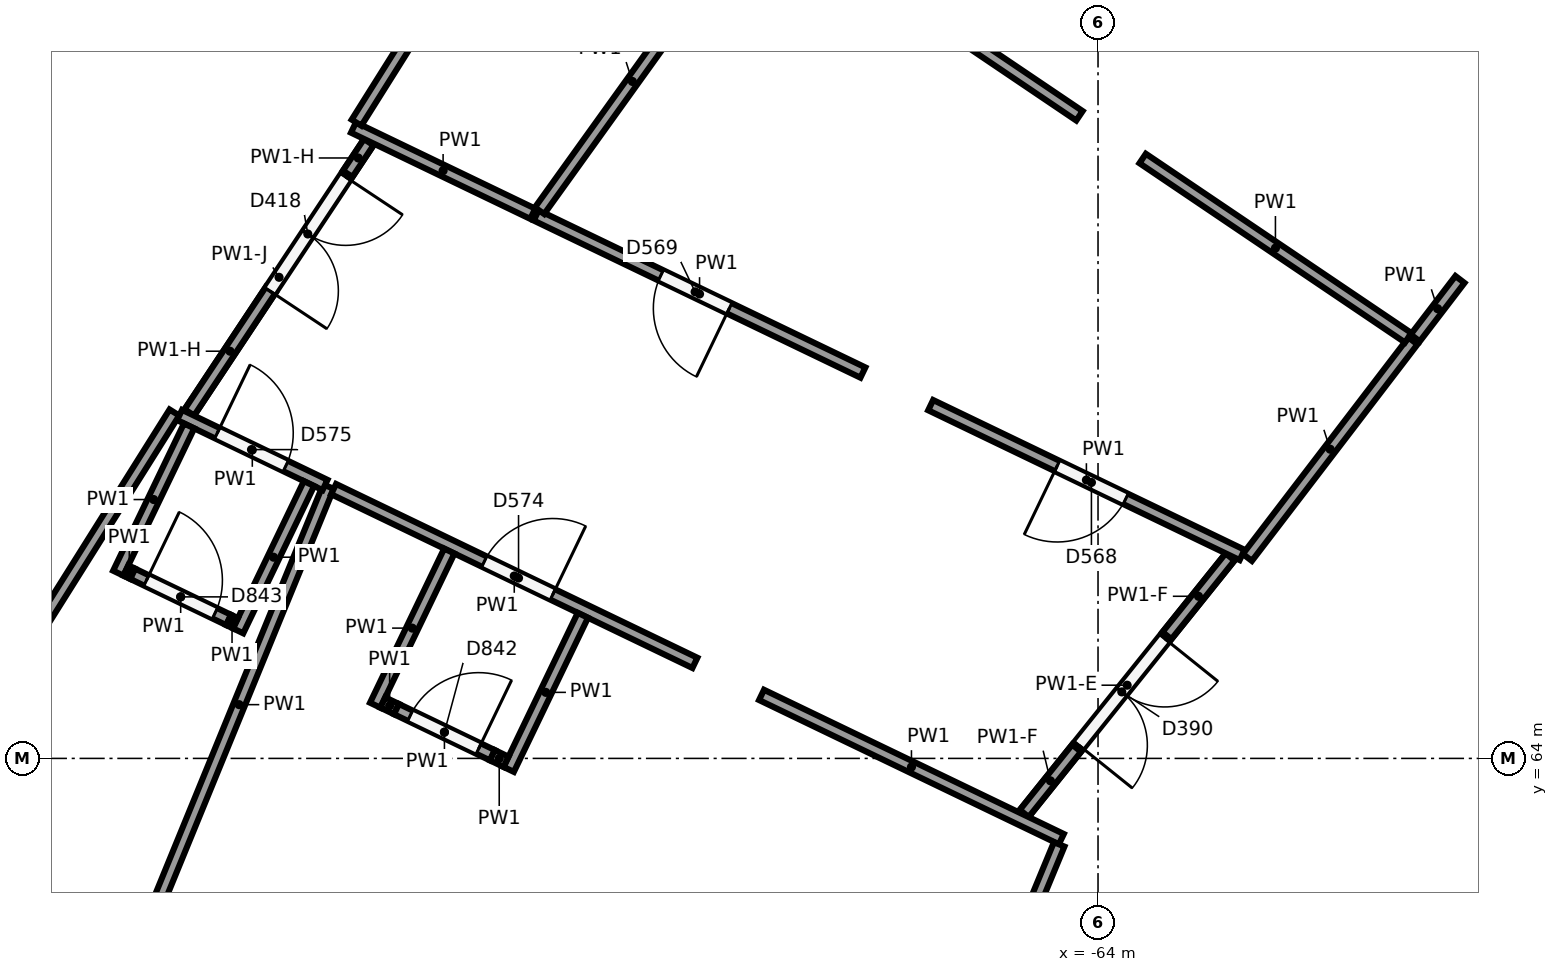
"""IFC4 building model, lengths in metres.
Left out: names, types, materials, properties, quantities, classifications, styles, units other than length and angle.
Written with IfcOpenShell. Run it as: python <this file> out.ifc"""

import sys

from ifc_helpers import new_model, si_unit, direction, frame, frame_2d, origin, origin_2d, place, context, subcontext, project, spatial, rectangle, circle, extrude, element, fill, save


model = new_model("IFC4")
c1 = context("Model", 3, precision=1e-05, world=origin(), true_north=direction((0.0, 1.0)))
c2 = subcontext(c1, "Body", "Model", "MODEL_VIEW")
j1 = project(units=[si_unit("LENGTHUNIT", "METRE"), si_unit("PLANEANGLEUNIT", "RADIAN")], contexts=[c1])
p1 = place(None, origin())
s1 = spatial("IfcSite", under=j1, at=p1, CompositionType="ELEMENT")
p2 = place(p1, origin())
s2 = spatial("IfcBuilding", under=s1, at=p2, CompositionType="ELEMENT")
p3 = place(p2, origin())
s3 = spatial("IfcBuildingStorey", under=s2, at=p3, CompositionType="ELEMENT", Elevation=0.0)
for number, where, z_axis, x_axis in (
    (1, (-63.068, 73.47, 0.0), (0.0, 0.0, 1.0), (1.0, 0.0, 0.0)),
    (2, (-59.049, 62.766, 0.0), (0.0, 0.0, 1.0), (1.0, 0.0, 0.0)),
):
    element("IfcColumn", number, at=place(p3, frame(where, z_axis=z_axis, x_axis=x_axis)), inside=s3, PredefinedType="COLUMN", context=c2, shape_type="SweptSolid", body=[
        extrude(circle(Radius=0.45, at=origin_2d()), origin(), (0.0, 0.0, 1.0), 6.5),
    ])
p4 = place(p3, frame((-60.222, 63.331, 0.0), z_axis=(0.0, 0.0, 1.0), x_axis=(1.0, 0.0, 0.0)))
e3 = element("IfcColumn", 3, at=p4, inside=s3, PredefinedType="COLUMN", context=c2, shape_type="SweptSolid", body=[
    extrude(circle(Radius=0.4, at=origin_2d()), origin(), (0.0, 0.0, 1.0), 6.5),
])
p5 = place(p3, frame((-67.972, 67.058, 0.0), z_axis=(0.0, 0.0, 1.0), x_axis=(1.0, 0.0, 0.0)))
e4 = element("IfcColumn", 4, at=p5, inside=s3, PredefinedType="COLUMN", context=c2, shape_type="SweptSolid", body=[
    extrude(circle(Radius=0.45, at=origin_2d()), origin(), (0.0, 0.0, 1.0), 6.5),
])
p6 = place(p3, frame((-78.198, 72.272, 0.0), z_axis=(0.0, 0.0, 1.0), x_axis=(1.0, 0.0, 0.0)))
e5 = element("IfcColumn", 5, at=p6, inside=s3, PredefinedType="COLUMN", context=c2, shape_type="SweptSolid", body=[
    extrude(circle(Radius=0.6, at=origin_2d()), origin(), (0.0, 0.0, 1.0), 6.5),
])
p7 = place(p3, frame((-59.857, 69.492, 0.0), z_axis=(0.0, 0.0, 1.0), x_axis=(-0.607500647977, -0.794319181883, 0.0)))
e6 = element("IfcWall", 6, at=p7, inside=s3, PredefinedType="PARTITIONING", context=c2, shape_type="SweptSolid", body=[
    extrude(rectangle(XDim=3.586, YDim=0.15, at=frame_2d((1.793, 0.0))), origin(), (0.0, 0.0, 1.0), 6.15),
])
p8 = place(p3, frame((-62.104, 66.677, 0.0), z_axis=(0.0, 0.0, 1.0), x_axis=(-0.901215323509, 0.433371596523, 0.0)))
e7 = element("IfcWall", 7, at=p8, inside=s3, PredefinedType="PARTITIONING", context=c2, shape_type="SweptSolid", body=[
    extrude(rectangle(XDim=4.547, YDim=0.15, at=frame_2d((2.273, 0.0))), origin(), (0.0, 0.0, 1.0), 6.15),
])
p9 = place(p8, frame((1.7, 0.0, 0.0)))
e8 = element("IfcOpeningElement", 8, at=p9, cuts=e7, PredefinedType="OPENING", context=c2, shape_type="SweptSolid", body=[
    extrude(rectangle(XDim=1.0, YDim=2.1, at=frame_2d((0.5, 1.05))), frame((0.0, 0.085, 0.0), z_axis=(0.0, -1.0, 0.0), x_axis=(1.0, 0.0, 0.0)), (0.0, 0.0, 1.0), 0.17),
])
p10 = place(p3, frame((-63.413, 71.893, 0.0), z_axis=(0.0, 0.0, 1.0), x_axis=(0.828828529776, -0.559502697249, 0.0)))
e9 = element("IfcWall", 9, at=p10, inside=s3, PredefinedType="PARTITIONING", context=c2, shape_type="SweptSolid", body=[
    extrude(rectangle(XDim=4.215, YDim=0.15, at=frame_2d((2.107, 0.0))), origin(), (0.0, 0.0, 1.0), 6.15),
])
p11 = place(p3, frame((-67.094, 69.076, 0.0), z_axis=(0.0, 0.0, 1.0), x_axis=(-0.901200145097, 0.433403159284, 0.0)))
e10 = element("IfcWall", 10, at=p11, inside=s3, PredefinedType="PARTITIONING", context=c2, shape_type="SweptSolid", body=[
    extrude(rectangle(XDim=4.77, YDim=0.15, at=frame_2d((2.385, 0.0))), origin(), (0.0, 0.0, 1.0), 6.15),
])
p12 = place(p11, frame((1.95, 0.0, 0.0)))
e11 = element("IfcOpeningElement", 11, at=p12, cuts=e10, PredefinedType="OPENING", context=c2, shape_type="SweptSolid", body=[
    extrude(rectangle(XDim=1.0, YDim=2.1, at=frame_2d((0.5, 1.05))), frame((0.0, 0.085, 0.0), z_axis=(0.0, -1.0, 0.0), x_axis=(1.0, 0.0, 0.0)), (0.0, 0.0, 1.0), 0.17),
])
p13 = place(p3, frame((-71.348, 71.206, 0.0), z_axis=(0.0, 0.0, 1.0), x_axis=(0.583304436704, 0.812253614409, 0.0)))
e12 = element("IfcWall", 12, at=p13, inside=s3, PredefinedType="PARTITIONING", context=c2, shape_type="SweptSolid", body=[
    extrude(rectangle(XDim=4.188, YDim=0.15, at=frame_2d((2.094, 0.0))), origin(), (0.0, 0.0, 1.0), 6.15),
])
p14 = place(p3, frame((-68.075, 75.04, 0.0), z_axis=(0.0, 0.0, 1.0), x_axis=(0.82883458938, -0.55949372065, 0.0)))
e13 = element("IfcWall", 13, at=p14, inside=s3, PredefinedType="PARTITIONING", context=c2, shape_type="SweptSolid", body=[
    extrude(rectangle(XDim=4.622, YDim=0.15, at=frame_2d((2.311, 0.0))), origin(), (0.0, 0.0, 1.0), 6.15),
])
p15 = place(p3, frame((-59.238, 70.301, 0.0), z_axis=(0.0, 0.0, 1.0), x_axis=(-0.607515602577, -0.794307744282, 0.0)))
e14 = element("IfcWall", 14, at=p15, inside=s3, PredefinedType="PARTITIONING", context=c2, shape_type="SweptSolid", body=[
    extrude(rectangle(XDim=0.969, YDim=0.15, at=frame_2d((0.484, 0.0))), origin(), (0.0, 0.0, 1.0), 6.15),
])
p16 = place(p3, frame((-71.437, 71.165, 0.0), z_axis=(0.0, 0.0, 1.0), x_axis=(-0.901204092293, 0.433394951556, 0.0)))
e15 = element("IfcWall", 15, at=p16, inside=s3, PredefinedType="PARTITIONING", context=c2, shape_type="SweptSolid", body=[
    extrude(rectangle(XDim=2.618, YDim=0.15, at=frame_2d((1.309, 0.0))), origin(), (0.0, 0.0, 1.0), 6.15),
])
p17 = place(p3, frame((-73.756, 72.364, 0.0), z_axis=(0.0, 0.0, 1.0), x_axis=(0.532054374811, 0.846710187871, 0.0)))
e16 = element("IfcWall", 16, at=p17, inside=s3, PredefinedType="PARTITIONING", context=c2, shape_type="SweptSolid", body=[
    extrude(rectangle(XDim=2.731, YDim=0.15, at=frame_2d((1.366, 0.0))), origin(), (0.0, 0.0, 1.0), 6.15),
])
p18 = place(p3, frame((-76.476, 61.839, 0.0), z_axis=(0.0, 0.0, 1.0), x_axis=(0.3791112098, 0.92535111747, 0.0)))
e17 = element("IfcWall", 17, at=p18, inside=s3, PredefinedType="PARTITIONING", context=c2, shape_type="SweptSolid", body=[
    extrude(rectangle(XDim=6.2, YDim=0.15, at=frame_2d((3.1, 0.0))), origin(), (0.0, 0.0, 1.0), 6.15),
])
p19 = place(p3, frame((-74.058, 67.543, 0.0), z_axis=(0.0, 0.0, 1.0), x_axis=(0.90118985402, -0.433424557462, 0.0)))
e18 = element("IfcWall", 18, at=p19, inside=s3, PredefinedType="PARTITIONING", context=c2, shape_type="SweptSolid", body=[
    extrude(rectangle(XDim=5.275, YDim=0.15, at=frame_2d((2.638, 0.0))), origin(), (0.0, 0.0, 1.0), 6.15),
])
p20 = place(p19, frame((2.2, 0.0, 0.0)))
e19 = element("IfcOpeningElement", 19, at=p20, cuts=e18, PredefinedType="OPENING", context=c2, shape_type="SweptSolid", body=[
    extrude(rectangle(XDim=1.0, YDim=2.1, at=frame_2d((0.5, 1.05))), frame((0.0, 0.085, 0.0), z_axis=(0.0, -1.0, 0.0), x_axis=(1.0, 0.0, 0.0)), (0.0, 0.0, 1.0), 0.17),
])
p21 = place(p3, frame((-68.427, 64.835, 0.0), z_axis=(0.0, 0.0, 1.0), x_axis=(0.901214723888, -0.433372843459, 0.0)))
e20 = element("IfcWall", 20, at=p21, inside=s3, PredefinedType="PARTITIONING", context=c2, shape_type="SweptSolid", body=[
    extrude(rectangle(XDim=4.377, YDim=0.15, at=frame_2d((2.188, 0.0))), origin(), (0.0, 0.0, 1.0), 6.15),
])
p22 = place(p3, frame((-64.511, 62.869, 0.0), z_axis=(0.0, 0.0, 1.0), x_axis=(-0.382677430763, -0.923882018433, 0.0)))
e21 = element("IfcWall", 21, at=p22, inside=s3, PredefinedType="PARTITIONING", context=c2, shape_type="SweptSolid", body=[
    extrude(rectangle(XDim=4.591, YDim=0.15, at=frame_2d((2.295, 0.0))), origin(), (0.0, 0.0, 1.0), 6.15),
])
p23 = place(p3, frame((-79.605, 63.055, 0.0), z_axis=(0.0, 0.0, 1.0), x_axis=(0.532032873767, 0.846723698281, 0.0)))
e22 = element("IfcWall", 22, at=p23, inside=s3, PredefinedType="PARTITIONING", context=c2, shape_type="SweptSolid", body=[
    extrude(rectangle(XDim=6.49, YDim=0.15, at=frame_2d((3.245, 0.0))), origin(), (0.0, 0.0, 1.0), 6.15),
])
p24 = place(p3, frame((-76.084, 68.518, 0.0), z_axis=(0.0, 0.0, 1.0), x_axis=(0.901196299468, -0.433411155631, 0.0)))
e23 = element("IfcWall", 23, at=p24, inside=s3, PredefinedType="PARTITIONING", context=c2, shape_type="SweptSolid", body=[
    extrude(rectangle(XDim=2.124, YDim=0.15, at=frame_2d((1.062, 0.0))), origin(), (0.0, 0.0, 1.0), 6.15),
])
p25 = place(p24, frame((0.55, 0.0, 0.0)))
e24 = element("IfcOpeningElement", 24, at=p25, cuts=e23, PredefinedType="OPENING", context=c2, shape_type="SweptSolid", body=[
    extrude(rectangle(XDim=1.0, YDim=2.1, at=frame_2d((0.5, 1.05))), frame((0.0, 0.085, 0.0), z_axis=(0.0, -1.0, 0.0), x_axis=(1.0, 0.0, 0.0)), (0.0, 0.0, 1.0), 0.17),
])
p26 = place(p3, frame((-72.535, 66.728, 0.0), z_axis=(0.0, 0.0, 1.0), x_axis=(-0.433401217297, -0.901201079031, 0.0)))
e25 = element("IfcWall", 25, at=p26, inside=s3, PredefinedType="PARTITIONING", context=c2, shape_type="SweptSolid", body=[
    extrude(rectangle(XDim=2.25, YDim=0.15, at=frame_2d((1.125, 0.0))), origin(), (0.0, 0.0, 1.0), 6.15),
])
p27 = place(p3, frame((-70.778, 65.883, 0.0), z_axis=(0.0, 0.0, 1.0), x_axis=(-0.433446957245, -0.901179080569, 0.0)))
e26 = element("IfcWall", 26, at=p27, inside=s3, PredefinedType="PARTITIONING", context=c2, shape_type="SweptSolid", body=[
    extrude(rectangle(XDim=2.25, YDim=0.15, at=frame_2d((1.125, 0.0))), origin(), (0.0, 0.0, 1.0), 6.15),
])
p28 = place(p3, frame((-73.41, 64.735, 0.0), z_axis=(0.0, 0.0, 1.0), x_axis=(0.901160703759, -0.433485162377, 0.0)))
e27 = element("IfcWall", 27, at=p28, inside=s3, PredefinedType="PARTITIONING", context=c2, shape_type="SweptSolid", body=[
    extrude(rectangle(XDim=0.2, YDim=0.15, at=frame_2d((0.1, 0.0))), origin(), (0.0, 0.0, 1.0), 6.15),
])
p29 = place(p3, frame((-73.23, 64.649, 0.0), z_axis=(0.0, 0.0, 1.0), x_axis=(0.901158119361, -0.433490534971, 0.0)))
e28 = element("IfcWall", 28, at=p29, inside=s3, PredefinedType="PARTITIONING", context=c2, shape_type="SweptSolid", body=[
    extrude(rectangle(XDim=1.4, YDim=0.15, at=frame_2d((0.7, 0.0))), origin(), (0.0, 0.0, 1.0), 6.15),
])
p30 = place(p29, frame((0.2, 0.0, 0.0)))
e29 = element("IfcOpeningElement", 29, at=p30, cuts=e28, PredefinedType="OPENING", context=c2, shape_type="SweptSolid", body=[
    extrude(rectangle(XDim=1.0, YDim=2.1, at=frame_2d((0.5, 1.05))), frame((0.0, 0.085, 0.0), z_axis=(0.0, -1.0, 0.0), x_axis=(1.0, 0.0, 0.0)), (0.0, 0.0, 1.0), 0.17),
])
p31 = place(p3, frame((-71.969, 64.042, 0.0), z_axis=(0.0, 0.0, 1.0), x_axis=(0.901160703759, -0.433485162377, 0.0)))
e30 = element("IfcWall", 30, at=p31, inside=s3, PredefinedType="PARTITIONING", context=c2, shape_type="SweptSolid", body=[
    extrude(rectangle(XDim=0.2, YDim=0.15, at=frame_2d((0.1, 0.0))), origin(), (0.0, 0.0, 1.0), 6.15),
])
for number, where, z_axis, x_axis in (
    (31, (-75.959, 68.375, 0.0), (0.0, 0.0, 1.0), (-0.433, -0.901, 0.0)),
    (32, (-74.382, 67.616, 0.0), (0.0, 0.0, 1.0), (-0.433, -0.901, 0.0)),
):
    element("IfcWall", number, at=place(p3, frame(where, z_axis=z_axis, x_axis=x_axis)), inside=s3, PredefinedType="PARTITIONING", context=c2, shape_type="SweptSolid", body=[
        extrude(rectangle(XDim=2.15, YDim=0.15, at=frame_2d((1.075, 0.0))), origin(), (0.0, 0.0, 1.0), 6.15),
    ])
p32 = place(p3, frame((-76.791, 66.472, 0.0), z_axis=(0.0, 0.0, 1.0), x_axis=(0.900683407008, -0.434476006633, 0.0)))
e33 = element("IfcWall", 33, at=p32, inside=s3, PredefinedType="PARTITIONING", context=c2, shape_type="SweptSolid", body=[
    extrude(rectangle(XDim=0.1, YDim=0.15, at=frame_2d((0.05, 0.0))), origin(), (0.0, 0.0, 1.0), 6.15),
])
p33 = place(p3, frame((-76.701, 66.428, 0.0), z_axis=(0.0, 0.0, 1.0), x_axis=(0.901226230947, -0.433348913294, 0.0)))
e34 = element("IfcWall", 34, at=p33, inside=s3, PredefinedType="PARTITIONING", context=c2, shape_type="SweptSolid", body=[
    extrude(rectangle(XDim=1.4, YDim=0.15, at=frame_2d((0.7, 0.0))), origin(), (0.0, 0.0, 1.0), 6.15),
])
p34 = place(p33, frame((0.2, 0.0, 0.0)))
e35 = element("IfcOpeningElement", 35, at=p34, cuts=e34, PredefinedType="OPENING", context=c2, shape_type="SweptSolid", body=[
    extrude(rectangle(XDim=1.0, YDim=2.1, at=frame_2d((0.5, 1.05))), frame((0.0, 0.085, 0.0), z_axis=(0.0, -1.0, 0.0), x_axis=(1.0, 0.0, 0.0)), (0.0, 0.0, 1.0), 0.17),
])
p35 = place(p3, frame((-75.439, 65.822, 0.0), z_axis=(0.0, 0.0, 1.0), x_axis=(0.900683407008, -0.434476006633, 0.0)))
e36 = element("IfcWall", 36, at=p35, inside=s3, PredefinedType="PARTITIONING", context=c2, shape_type="SweptSolid", body=[
    extrude(rectangle(XDim=0.1, YDim=0.15, at=frame_2d((0.05, 0.0))), origin(), (0.0, 0.0, 1.0), 6.15),
])
p36 = place(p3, frame((-73.595, 72.108, 0.0), z_axis=(0.0, 0.0, 1.0), x_axis=(-0.552890314707, -0.833254042837, 0.0)))
e37 = element("IfcWall", 37, at=p36, inside=s3, PredefinedType="PARTITIONING", context=c2, shape_type="SweptSolid", body=[
    extrude(rectangle(XDim=4.268, YDim=0.15, at=frame_2d((2.134, 0.0))), origin(), (0.0, 0.0, 1.0), 5.05),
])
p37 = place(p36, frame((0.55, 0.0, 0.0)))
e38 = element("IfcOpeningElement", 38, at=p37, cuts=e37, PredefinedType="OPENING", context=c2, shape_type="SweptSolid", body=[
    extrude(rectangle(XDim=1.8, YDim=2.1, at=frame_2d((0.9, 1.05))), frame((0.0, 0.085, 0.0), z_axis=(0.0, -1.0, 0.0), x_axis=(1.0, 0.0, 0.0)), (0.0, 0.0, 1.0), 0.17),
])
p38 = place(p3, frame((-73.595, 72.108, 5.05), z_axis=(0.0, 0.0, 1.0), x_axis=(-0.552670537612, -0.833399830127, 0.0)))
e39 = element("IfcWall", 39, at=p38, inside=s3, PredefinedType="PARTITIONING", context=c2, shape_type="SweptSolid", body=[
    extrude(rectangle(XDim=0.5, YDim=0.15, at=frame_2d((0.25, 0.0))), origin(), (0.0, 0.0, 1.0), 1.1),
])
p39 = place(p3, frame((-74.886, 70.163, 5.05), z_axis=(0.0, 0.0, 1.0), x_axis=(-0.552921485194, -0.833233359396, 0.0)))
e40 = element("IfcWall", 40, at=p39, inside=s3, PredefinedType="PARTITIONING", context=c2, shape_type="SweptSolid", body=[
    extrude(rectangle(XDim=1.934, YDim=0.15, at=frame_2d((0.967, 0.0))), origin(), (0.0, 0.0, 1.0), 1.1),
])
p40 = place(p3, frame((-62.263, 66.65, 0.0), z_axis=(0.0, 0.0, 1.0), x_axis=(-0.625864340601, -0.77993193752, 0.0)))
e41 = element("IfcWall", 41, at=p40, inside=s3, PredefinedType="PARTITIONING", context=c2, shape_type="SweptSolid", body=[
    extrude(rectangle(XDim=4.326, YDim=0.15, at=frame_2d((2.163, 0.0))), origin(), (0.0, 0.0, 1.0), 5.25),
])
p41 = place(p40, frame((1.376, 0.0, 0.0)))
e42 = element("IfcOpeningElement", 42, at=p41, cuts=e41, PredefinedType="OPENING", context=c2, shape_type="SweptSolid", body=[
    extrude(rectangle(XDim=1.8, YDim=2.1, at=frame_2d((0.9, 1.05))), frame((0.0, 0.085, 0.0), z_axis=(0.0, -1.0, 0.0), x_axis=(1.0, 0.0, 0.0)), (0.0, 0.0, 1.0), 0.17),
])
p42 = place(p3, frame((-64.282, 64.134, 5.25), z_axis=(0.0, 0.0, 1.0), x_axis=(-0.625885246077, -0.779915161247, 0.0)))
e43 = element("IfcWall", 43, at=p42, inside=s3, PredefinedType="PARTITIONING", context=c2, shape_type="SweptSolid", body=[
    extrude(rectangle(XDim=1.1, YDim=0.15, at=frame_2d((0.55, 0.0))), origin(), (0.0, 0.0, 1.0), 0.9),
])
p43 = place(p3, frame((-62.263, 66.65, 5.25), z_axis=(0.0, 0.0, 1.0), x_axis=(-0.62586166686, -0.779934083084, 0.0)))
e44 = element("IfcWall", 44, at=p43, inside=s3, PredefinedType="PARTITIONING", context=c2, shape_type="SweptSolid", body=[
    extrude(rectangle(XDim=1.326, YDim=0.15, at=frame_2d((0.663, 0.0))), origin(), (0.0, 0.0, 1.0), 0.9),
])
p44 = place(p9, origin())
e45 = element("IfcDoor", 45, at=p44, inside=s3, OperationType="SINGLE_SWING_RIGHT", PredefinedType="DOOR", context=c2, shape_type="SweptSolid", body=[
    extrude(rectangle(XDim=1.0, YDim=2.1, at=frame_2d((0.5, 1.05))), frame((0.0, 0.025, 0.0), z_axis=(0.0, -1.0, 0.0), x_axis=(1.0, 0.0, 0.0)), (0.0, 0.0, 1.0), 0.05),
])
fill(e8, e45)
p45 = place(p12, origin())
e46 = element("IfcDoor", 46, at=p45, inside=s3, OperationType="SINGLE_SWING_LEFT", PredefinedType="DOOR", context=c2, shape_type="SweptSolid", body=[
    extrude(rectangle(XDim=1.0, YDim=2.1, at=frame_2d((0.5, 1.05))), frame((0.0, 0.025, 0.0), z_axis=(0.0, -1.0, 0.0), x_axis=(1.0, 0.0, 0.0)), (0.0, 0.0, 1.0), 0.05),
])
fill(e11, e46)
p46 = place(p20, origin())
e47 = element("IfcDoor", 47, at=p46, inside=s3, OperationType="SINGLE_SWING_RIGHT", PredefinedType="DOOR", context=c2, shape_type="SweptSolid", body=[
    extrude(rectangle(XDim=1.0, YDim=2.1, at=frame_2d((0.5, 1.05))), frame((0.0, 0.025, 0.0), z_axis=(0.0, -1.0, 0.0), x_axis=(1.0, 0.0, 0.0)), (0.0, 0.0, 1.0), 0.05),
])
fill(e19, e47)
p47 = place(p25, origin())
e48 = element("IfcDoor", 48, at=p47, inside=s3, OperationType="SINGLE_SWING_LEFT", PredefinedType="DOOR", context=c2, shape_type="SweptSolid", body=[
    extrude(rectangle(XDim=1.0, YDim=2.1, at=frame_2d((0.5, 1.05))), frame((0.0, 0.025, 0.0), z_axis=(0.0, -1.0, 0.0), x_axis=(1.0, 0.0, 0.0)), (0.0, 0.0, 1.0), 0.05),
])
fill(e24, e48)
p48 = place(p30, origin())
e49 = element("IfcDoor", 49, at=p48, inside=s3, OperationType="SINGLE_SWING_RIGHT", PredefinedType="DOOR", context=c2, shape_type="SweptSolid", body=[
    extrude(rectangle(XDim=1.0, YDim=2.1, at=frame_2d((0.5, 1.05))), frame((0.0, 0.025, 0.0), z_axis=(0.0, -1.0, 0.0), x_axis=(1.0, 0.0, 0.0)), (0.0, 0.0, 1.0), 0.05),
])
fill(e29, e49)
p49 = place(p34, origin())
e50 = element("IfcDoor", 50, at=p49, inside=s3, OperationType="SINGLE_SWING_LEFT", PredefinedType="DOOR", context=c2, shape_type="SweptSolid", body=[
    extrude(rectangle(XDim=1.0, YDim=2.1, at=frame_2d((0.5, 1.05))), frame((0.0, 0.025, 0.0), z_axis=(0.0, -1.0, 0.0), x_axis=(1.0, 0.0, 0.0)), (0.0, 0.0, 1.0), 0.05),
])
fill(e35, e50)
p50 = place(p37, origin())
e51 = element("IfcDoor", 51, at=p50, inside=s3, OperationType="DOUBLE_DOOR_SINGLE_SWING", PredefinedType="DOOR", context=c2, shape_type="SweptSolid", body=[
    extrude(rectangle(XDim=1.8, YDim=2.1, at=frame_2d((0.9, 1.05))), frame((0.0, 0.025, 0.0), z_axis=(0.0, -1.0, 0.0), x_axis=(1.0, 0.0, 0.0)), (0.0, 0.0, 1.0), 0.05),
])
fill(e38, e51)
p51 = place(p41, origin())
e52 = element("IfcDoor", 52, at=p51, inside=s3, OperationType="DOUBLE_DOOR_SINGLE_SWING", PredefinedType="DOOR", context=c2, shape_type="SweptSolid", body=[
    extrude(rectangle(XDim=1.8, YDim=2.1, at=frame_2d((0.9, 1.05))), frame((0.0, 0.025, 0.0), z_axis=(0.0, -1.0, 0.0), x_axis=(1.0, 0.0, 0.0)), (0.0, 0.0, 1.0), 0.05),
])
fill(e42, e52)
save(model, sys.argv[1])
